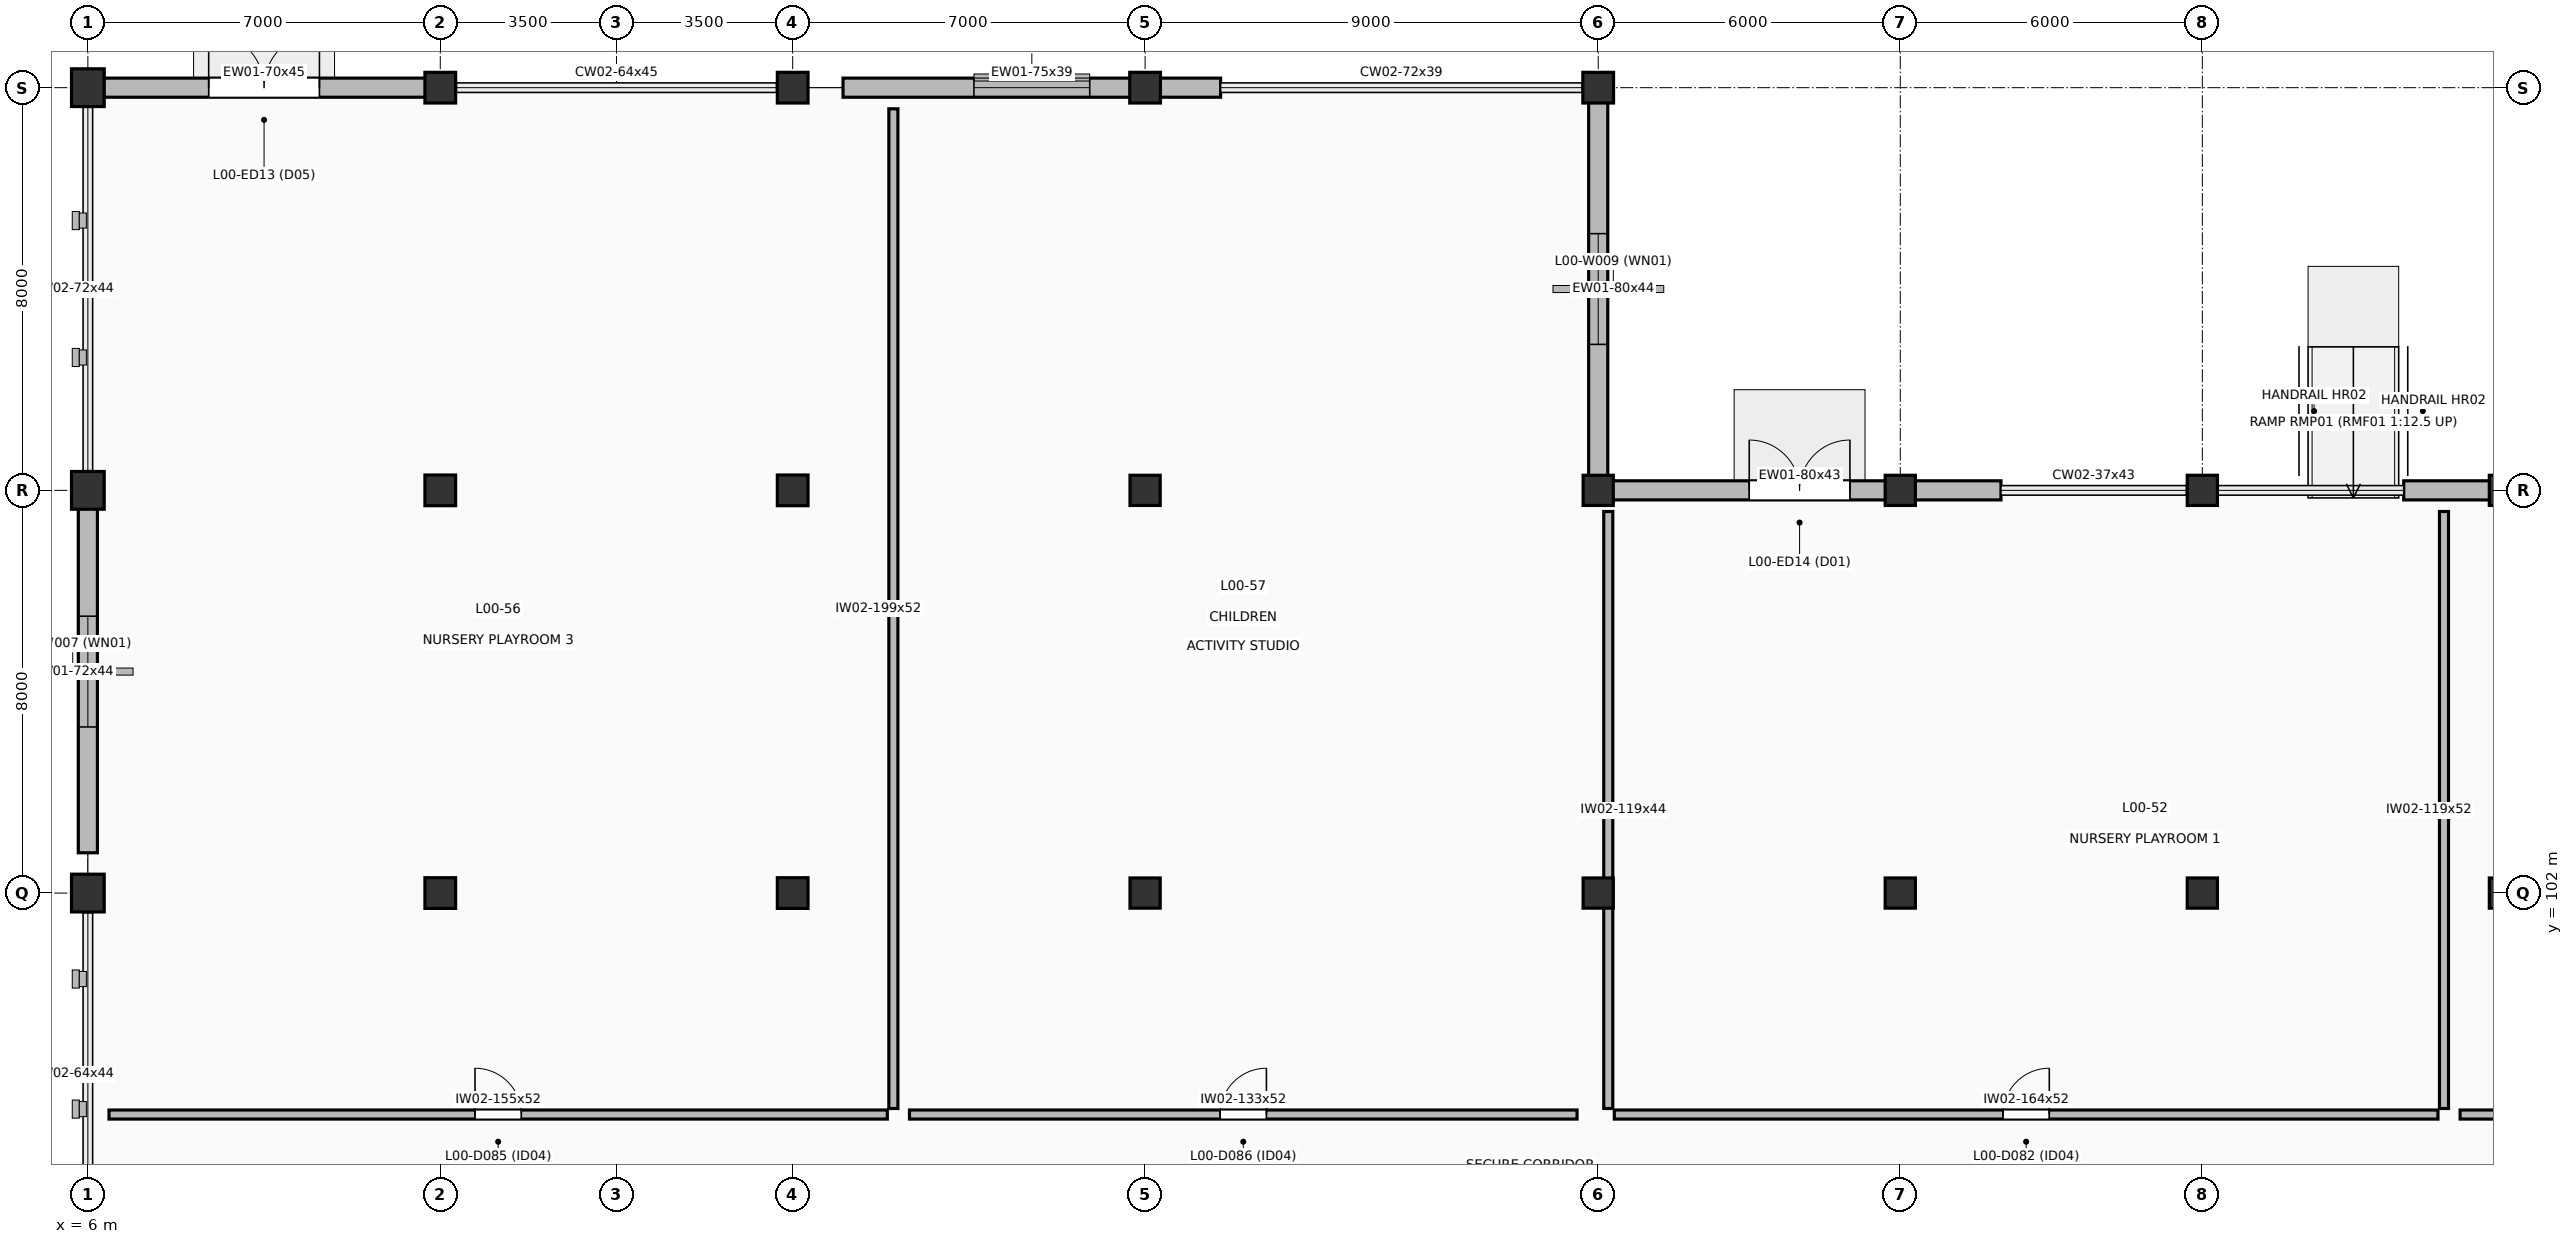
"""IFC4 building model, lengths in metres.
Left out: names, types, materials, properties, quantities, classifications, styles, units other than length and angle.
Written with IfcOpenShell. Run it as: python <this file> out.ifc"""

import sys

from ifc_helpers import new_model, si_unit, direction, frame, frame_2d, origin, origin_2d, place, context, subcontext, project, spatial, rectangle, extrude, element, fill, save


model = new_model("IFC4")
c1 = context("Model", 3, precision=1e-05, world=origin(), true_north=direction((0.0, 1.0)))
c2 = subcontext(c1, "Body", "Model", "MODEL_VIEW")
j1 = project(units=[si_unit("LENGTHUNIT", "METRE"), si_unit("PLANEANGLEUNIT", "RADIAN")], contexts=[c1])
p1 = place(None, origin())
s1 = spatial("IfcSite", under=j1, at=p1, CompositionType="ELEMENT")
p2 = place(p1, origin())
s2 = spatial("IfcBuilding", under=s1, at=p2, CompositionType="ELEMENT")
p3 = place(p2, origin())
s3 = spatial("IfcBuildingStorey", under=s2, at=p3, CompositionType="ELEMENT", Elevation=0.0)
for number, where, z_axis, x_axis in (
    (1, (6.0, 102.0, 0.0), (0.0, 0.0, 1.0), (1.0, 0.0, 0.0)),
    (2, (6.0, 110.0, 0.0), (0.0, 0.0, 1.0), (1.0, 0.0, 0.0)),
    (3, (6.0, 118.0, 0.0), (0.0, 0.0, 1.0), (1.0, 0.0, 0.0)),
):
    element("IfcColumn", number, at=place(p3, frame(where, z_axis=z_axis, x_axis=x_axis)), inside=s3, PredefinedType="PILASTER", context=c2, shape_type="SweptSolid", body=[
        extrude(rectangle(XDim=0.65, YDim=0.75, at=origin_2d()), origin(), (0.0, 0.0, 1.0), 5.4),
    ])
for number, where, z_axis, x_axis in (
    (4, (13.0, 102.0, 0.0), (0.0, 0.0, 1.0), (1.0, 0.0, 0.0)),
    (5, (13.0, 110.0, 0.0), (0.0, 0.0, 1.0), (1.0, 0.0, 0.0)),
    (6, (13.0, 118.0, 0.0), (0.0, 0.0, 1.0), (1.0, 0.0, 0.0)),
    (7, (20.0, 102.0, 0.0), (0.0, 0.0, 1.0), (1.0, 0.0, 0.0)),
    (8, (20.0, 110.0, 0.0), (0.0, 0.0, 1.0), (1.0, 0.0, 0.0)),
    (9, (20.0, 118.0, 0.0), (0.0, 0.0, 1.0), (1.0, 0.0, 0.0)),
):
    element("IfcColumn", number, at=place(p3, frame(where, z_axis=z_axis, x_axis=x_axis)), inside=s3, PredefinedType="COLUMN", context=c2, shape_type="SweptSolid", body=[
        extrude(rectangle(XDim=0.61, YDim=0.61, at=origin_2d()), origin(), (0.0, 0.0, 1.0), 5.4),
    ])
for number, where, z_axis, x_axis in (
    (10, (27.0, 102.0, 0.0), (0.0, 0.0, 1.0), (1.0, 0.0, 0.0)),
    (11, (27.0, 110.0, 0.0), (0.0, 0.0, 1.0), (1.0, 0.0, 0.0)),
):
    element("IfcColumn", number, at=place(p3, frame(where, z_axis=z_axis, x_axis=x_axis)), inside=s3, PredefinedType="COLUMN", context=c2, shape_type="SweptSolid", body=[
        extrude(rectangle(XDim=0.6, YDim=0.6, at=origin_2d()), origin(), (0.0, 0.0, 1.0), 5.4),
    ])
p4 = place(p3, frame((27.0, 118.0, 0.0), z_axis=(0.0, 0.0, 1.0), x_axis=(1.0, 0.0, 0.0)))
e12 = element("IfcColumn", 12, at=p4, inside=s3, PredefinedType="COLUMN", context=c2, shape_type="SweptSolid", body=[
    extrude(rectangle(XDim=0.61, YDim=0.61, at=origin_2d()), origin(), (0.0, 0.0, 1.0), 5.4),
])
for number, where, z_axis, x_axis in (
    (13, (36.0, 102.0, 0.0), (0.0, 0.0, 1.0), (1.0, 0.0, 0.0)),
    (14, (36.0, 110.0, 0.0), (0.0, 0.0, 1.0), (1.0, 0.0, 0.0)),
):
    element("IfcColumn", number, at=place(p3, frame(where, z_axis=z_axis, x_axis=x_axis)), inside=s3, PredefinedType="COLUMN", context=c2, shape_type="SweptSolid", body=[
        extrude(rectangle(XDim=0.6, YDim=0.6, at=origin_2d()), origin(), (0.0, 0.0, 1.0), 5.4),
    ])
p5 = place(p3, frame((36.0, 118.0, 0.0), z_axis=(0.0, 0.0, 1.0), x_axis=(1.0, 0.0, 0.0)))
e15 = element("IfcColumn", 15, at=p5, inside=s3, PredefinedType="COLUMN", context=c2, shape_type="SweptSolid", body=[
    extrude(rectangle(XDim=0.61, YDim=0.61, at=origin_2d()), origin(), (0.0, 0.0, 1.0), 5.4),
])
for number, where, z_axis, x_axis in (
    (16, (42.0, 102.0, 0.0), (0.0, 0.0, 1.0), (1.0, 0.0, 0.0)),
    (17, (42.0, 110.0, 0.0), (0.0, 0.0, 1.0), (1.0, 0.0, 0.0)),
    (18, (48.0, 102.0, 0.0), (0.0, 0.0, 1.0), (1.0, 0.0, 0.0)),
    (19, (48.0, 110.0, 0.0), (0.0, 0.0, 1.0), (1.0, 0.0, 0.0)),
    (20, (54.0, 102.0, 0.0), (0.0, 0.0, 1.0), (1.0, 0.0, 0.0)),
    (21, (54.0, 110.0, 0.0), (0.0, 0.0, 1.0), (1.0, 0.0, 0.0)),
):
    element("IfcColumn", number, at=place(p3, frame(where, z_axis=z_axis, x_axis=x_axis)), inside=s3, PredefinedType="COLUMN", context=c2, shape_type="SweptSolid", body=[
        extrude(rectangle(XDim=0.6, YDim=0.6, at=origin_2d()), origin(), (0.0, 0.0, 1.0), 5.4),
    ])
p6 = place(p3, frame((6.0, 102.8, 0.0), z_axis=(0.0, 0.0, 1.0), x_axis=(0.0, 1.0, 0.0)))
e22 = element("IfcWall", 22, at=p6, inside=s3, PredefinedType="SOLIDWALL", context=c2, shape_type="SweptSolid", body=[
    extrude(rectangle(XDim=7.2, YDim=0.38, at=frame_2d((3.6, 0.0))), origin(), (0.0, 0.0, 1.0), 4.445),
])
p7 = place(p6, frame((2.5, 0.0, 0.85)))
e23 = element("IfcOpeningElement", 23, at=p7, cuts=e22, PredefinedType="OPENING", context=c2, shape_type="SweptSolid", body=[
    extrude(rectangle(XDim=2.2, YDim=2.8, at=frame_2d((1.1, 1.4))), frame((0.0, 0.2, 0.0), z_axis=(0.0, -1.0, 0.0), x_axis=(1.0, 0.0, 0.0)), (0.0, 0.0, 1.0), 0.4),
])
p8 = place(p3, frame((6.0, 118.0, 0.0), z_axis=(0.0, 0.0, 1.0), x_axis=(1.0, 0.0, 0.0)))
e24 = element("IfcWall", 24, at=p8, inside=s3, PredefinedType="SOLIDWALL", context=c2, shape_type="SweptSolid", body=[
    extrude(rectangle(XDim=7.0, YDim=0.38, at=frame_2d((3.5, 0.0))), origin(), (0.0, 0.0, 1.0), 4.495),
])
p9 = place(p8, frame((2.4, 0.0, 0.0)))
e25 = element("IfcOpeningElement", 25, at=p9, cuts=e24, PredefinedType="OPENING", context=c2, shape_type="SweptSolid", body=[
    extrude(rectangle(XDim=2.2, YDim=2.45, at=frame_2d((1.1, 1.225))), frame((0.0, 0.2, 0.0), z_axis=(0.0, -1.0, 0.0), x_axis=(1.0, 0.0, 0.0)), (0.0, 0.0, 1.0), 0.4),
])
p10 = place(p3, frame((21.0, 118.0, 0.0), z_axis=(0.0, 0.0, 1.0), x_axis=(1.0, 0.0, 0.0)))
e26 = element("IfcWall", 26, at=p10, inside=s3, PredefinedType="SOLIDWALL", context=c2, shape_type="SweptSolid", body=[
    extrude(rectangle(XDim=7.5, YDim=0.38, at=frame_2d((3.75, 0.0))), origin(), (0.0, 0.0, 1.0), 3.945),
])
p11 = place(p10, frame((2.6, 0.0, 0.9)))
e27 = element("IfcOpeningElement", 27, at=p11, cuts=e26, PredefinedType="OPENING", context=c2, shape_type="SweptSolid", body=[
    extrude(rectangle(XDim=2.3, YDim=2.6, at=frame_2d((1.15, 1.3))), frame((0.0, 0.2, 0.0), z_axis=(0.0, -1.0, 0.0), x_axis=(1.0, 0.0, 0.0)), (0.0, 0.0, 1.0), 0.4),
])
p12 = place(p3, frame((36.0, 118.0, 0.0), z_axis=(0.0, 0.0, 1.0), x_axis=(0.0, -1.0, 0.0)))
e28 = element("IfcWall", 28, at=p12, inside=s3, PredefinedType="SOLIDWALL", context=c2, shape_type="SweptSolid", body=[
    extrude(rectangle(XDim=8.0, YDim=0.38, at=frame_2d((4.0, 0.0))), origin(), (0.0, 0.0, 1.0), 4.445),
])
p13 = place(p12, frame((2.9, 0.0, 0.85)))
e29 = element("IfcOpeningElement", 29, at=p13, cuts=e28, PredefinedType="OPENING", context=c2, shape_type="SweptSolid", body=[
    extrude(rectangle(XDim=2.2, YDim=2.8, at=frame_2d((1.1, 1.4))), frame((0.0, 0.2, 0.0), z_axis=(0.0, -1.0, 0.0), x_axis=(1.0, 0.0, 0.0)), (0.0, 0.0, 1.0), 0.4),
])
p14 = place(p3, frame((36.0, 110.0, 0.0), z_axis=(0.0, 0.0, 1.0), x_axis=(1.0, 0.0, 0.0)))
e30 = element("IfcWall", 30, at=p14, inside=s3, PredefinedType="SOLIDWALL", context=c2, shape_type="SweptSolid", body=[
    extrude(rectangle(XDim=8.0, YDim=0.38, at=frame_2d((4.0, 0.0))), origin(), (0.0, 0.0, 1.0), 4.315),
])
p15 = place(p14, frame((3.0, 0.0, 0.0)))
e31 = element("IfcOpeningElement", 31, at=p15, cuts=e30, PredefinedType="OPENING", context=c2, shape_type="SweptSolid", body=[
    extrude(rectangle(XDim=2.0, YDim=2.4, at=frame_2d((1.0, 1.2))), frame((0.0, 0.2, 0.0), z_axis=(0.0, -1.0, 0.0), x_axis=(1.0, 0.0, 0.0)), (0.0, 0.0, 1.0), 0.4),
])
p16 = place(p3, frame((52.0, 110.0, 0.0), z_axis=(0.0, 0.0, 1.0), x_axis=(1.0, 0.0, 0.0)))
e32 = element("IfcWall", 32, at=p16, inside=s3, PredefinedType="SOLIDWALL", context=c2, shape_type="SweptSolid", body=[
    extrude(rectangle(XDim=8.0, YDim=0.38, at=frame_2d((4.0, 0.0))), origin(), (0.0, 0.0, 1.0), 4.315),
])
p17 = place(p16, frame((3.15, 0.0, 1.8)))
e33 = element("IfcOpeningElement", 33, at=p17, cuts=e32, PredefinedType="OPENING", context=c2, shape_type="SweptSolid", body=[
    extrude(rectangle(XDim=1.7, YDim=1.1, at=frame_2d((0.85, 0.55))), frame((0.0, 0.2, 0.0), z_axis=(0.0, -1.0, 0.0), x_axis=(1.0, 0.0, 0.0)), (0.0, 0.0, 1.0), 0.4),
])
p18 = place(p3, frame((36.32, 97.6, 0.0), z_axis=(0.0, 0.0, 1.0), x_axis=(1.0, 0.0, 0.0)))
e34 = element("IfcWall", 34, at=p18, inside=s3, PredefinedType="PARTITIONING", context=c2, shape_type="SweptSolid", body=[
    extrude(rectangle(XDim=16.36, YDim=0.18, at=frame_2d((8.18, 0.0))), origin(), (0.0, 0.0, 1.0), 5.16),
])
p19 = place(p18, frame((7.72, 0.0, 0.0)))
e35 = element("IfcOpeningElement", 35, at=p19, cuts=e34, PredefinedType="OPENING", context=c2, shape_type="SweptSolid", body=[
    extrude(rectangle(XDim=0.92, YDim=2.1, at=frame_2d((0.46, 1.05))), frame((0.0, 0.1, 0.0), z_axis=(0.0, -1.0, 0.0), x_axis=(1.0, 0.0, 0.0)), (0.0, 0.0, 1.0), 0.2),
])
p20 = place(p3, frame((36.2, 109.58, 0.0), z_axis=(0.0, 0.0, 1.0), x_axis=(0.0, -1.0, 0.0)))
e36 = element("IfcWall", 36, at=p20, inside=s3, PredefinedType="PARTITIONING", context=c2, shape_type="SweptSolid", body=[
    extrude(rectangle(XDim=11.86, YDim=0.18, at=frame_2d((5.93, 0.0))), origin(), (0.0, 0.0, 1.0), 4.445),
])
p21 = place(p3, frame((52.8, 97.72, 0.0), z_axis=(0.0, 0.0, 1.0), x_axis=(0.0, 1.0, 0.0)))
e37 = element("IfcWall", 37, at=p21, inside=s3, PredefinedType="PARTITIONING", context=c2, shape_type="SweptSolid", body=[
    extrude(rectangle(XDim=11.86, YDim=0.18, at=frame_2d((5.93, 0.0))), origin(), (0.0, 0.0, 1.0), 5.16),
])
p22 = place(p3, frame((53.12, 97.6, 0.0), z_axis=(0.0, 0.0, 1.0), x_axis=(1.0, 0.0, 0.0)))
e38 = element("IfcWall", 38, at=p22, inside=s3, PredefinedType="PARTITIONING", context=c2, shape_type="SweptSolid", body=[
    extrude(rectangle(XDim=16.56, YDim=0.18, at=frame_2d((8.28, 0.0))), origin(), (0.0, 0.0, 1.0), 5.16),
])
p23 = place(p22, frame((7.82, 0.0, 0.0)))
e39 = element("IfcOpeningElement", 39, at=p23, cuts=e38, PredefinedType="OPENING", context=c2, shape_type="SweptSolid", body=[
    extrude(rectangle(XDim=0.92, YDim=2.1, at=frame_2d((0.46, 1.05))), frame((0.0, 0.1, 0.0), z_axis=(0.0, -1.0, 0.0), x_axis=(1.0, 0.0, 0.0)), (0.0, 0.0, 1.0), 0.2),
])
p24 = place(p3, frame((6.42, 97.6, 0.0), z_axis=(0.0, 0.0, 1.0), x_axis=(1.0, 0.0, 0.0)))
e40 = element("IfcWall", 40, at=p24, inside=s3, PredefinedType="PARTITIONING", context=c2, shape_type="SweptSolid", body=[
    extrude(rectangle(XDim=15.46, YDim=0.18, at=frame_2d((7.73, 0.0))), origin(), (0.0, 0.0, 1.0), 5.16),
])
p25 = place(p24, frame((7.27, 0.0, 0.0)))
e41 = element("IfcOpeningElement", 41, at=p25, cuts=e40, PredefinedType="OPENING", context=c2, shape_type="SweptSolid", body=[
    extrude(rectangle(XDim=0.92, YDim=2.1, at=frame_2d((0.46, 1.05))), frame((0.0, 0.1, 0.0), z_axis=(0.0, -1.0, 0.0), x_axis=(1.0, 0.0, 0.0)), (0.0, 0.0, 1.0), 0.2),
])
p26 = place(p3, frame((22.0, 97.72, 0.0), z_axis=(0.0, 0.0, 1.0), x_axis=(0.0, 1.0, 0.0)))
e42 = element("IfcWall", 42, at=p26, inside=s3, PredefinedType="PARTITIONING", context=c2, shape_type="SweptSolid", body=[
    extrude(rectangle(XDim=19.86, YDim=0.18, at=frame_2d((9.93, 0.0))), origin(), (0.0, 0.0, 1.0), 5.16),
])
p27 = place(p3, frame((22.32, 97.6, 0.0), z_axis=(0.0, 0.0, 1.0), x_axis=(1.0, 0.0, 0.0)))
e43 = element("IfcWall", 43, at=p27, inside=s3, PredefinedType="PARTITIONING", context=c2, shape_type="SweptSolid", body=[
    extrude(rectangle(XDim=13.26, YDim=0.18, at=frame_2d((6.63, 0.0))), origin(), (0.0, 0.0, 1.0), 5.16),
])
p28 = place(p27, frame((6.17, 0.0, 0.0)))
e44 = element("IfcOpeningElement", 44, at=p28, cuts=e43, PredefinedType="OPENING", context=c2, shape_type="SweptSolid", body=[
    extrude(rectangle(XDim=0.92, YDim=2.1, at=frame_2d((0.46, 1.05))), frame((0.0, 0.1, 0.0), z_axis=(0.0, -1.0, 0.0), x_axis=(1.0, 0.0, 0.0)), (0.0, 0.0, 1.0), 0.2),
])
p29 = place(p7, origin())
e45 = element("IfcWindow", 45, at=p29, inside=s3, PartitioningType="DOUBLE_PANEL_VERTICAL", PredefinedType="WINDOW", context=c2, shape_type="SweptSolid", body=[
    extrude(rectangle(XDim=2.2, YDim=2.8, at=frame_2d((1.1, 1.4))), frame((0.0, 0.03, 0.0), z_axis=(0.0, -1.0, 0.0), x_axis=(1.0, 0.0, 0.0)), (0.0, 0.0, 1.0), 0.06),
])
fill(e23, e45)
p30 = place(p9, origin())
e46 = element("IfcDoor", 46, at=p30, inside=s3, OperationType="DOUBLE_DOOR_SINGLE_SWING", PredefinedType="DOOR", context=c2, shape_type="SweptSolid", body=[
    extrude(rectangle(XDim=2.2, YDim=2.45, at=frame_2d((1.1, 1.225))), frame((0.0, 0.025, 0.0), z_axis=(0.0, -1.0, 0.0), x_axis=(1.0, 0.0, 0.0)), (0.0, 0.0, 1.0), 0.05),
])
fill(e25, e46)
p31 = place(p11, origin())
e47 = element("IfcWindow", 47, at=p31, inside=s3, PartitioningType="DOUBLE_PANEL_VERTICAL", PredefinedType="WINDOW", context=c2, shape_type="SweptSolid", body=[
    extrude(rectangle(XDim=2.3, YDim=2.6, at=frame_2d((1.15, 1.3))), frame((0.0, 0.03, 0.0), z_axis=(0.0, -1.0, 0.0), x_axis=(1.0, 0.0, 0.0)), (0.0, 0.0, 1.0), 0.06),
])
fill(e27, e47)
p32 = place(p13, origin())
e48 = element("IfcWindow", 48, at=p32, inside=s3, PartitioningType="DOUBLE_PANEL_VERTICAL", PredefinedType="WINDOW", context=c2, shape_type="SweptSolid", body=[
    extrude(rectangle(XDim=2.2, YDim=2.8, at=frame_2d((1.1, 1.4))), frame((0.0, 0.03, 0.0), z_axis=(0.0, -1.0, 0.0), x_axis=(1.0, 0.0, 0.0)), (0.0, 0.0, 1.0), 0.06),
])
fill(e29, e48)
p33 = place(p15, origin())
e49 = element("IfcDoor", 49, at=p33, inside=s3, OperationType="DOUBLE_DOOR_SINGLE_SWING", PredefinedType="DOOR", context=c2, shape_type="SweptSolid", body=[
    extrude(rectangle(XDim=2.0, YDim=2.4, at=frame_2d((1.0, 1.2))), frame((0.0, 0.025, 0.0), z_axis=(0.0, -1.0, 0.0), x_axis=(1.0, 0.0, 0.0)), (0.0, 0.0, 1.0), 0.05),
])
fill(e31, e49)
p34 = place(p19, origin())
e50 = element("IfcDoor", 50, at=p34, inside=s3, OperationType="SINGLE_SWING_RIGHT", PredefinedType="DOOR", context=c2, shape_type="SweptSolid", body=[
    extrude(rectangle(XDim=0.92, YDim=2.1, at=frame_2d((0.46, 1.05))), frame((0.0, 0.025, 0.0), z_axis=(0.0, -1.0, 0.0), x_axis=(1.0, 0.0, 0.0)), (0.0, 0.0, 1.0), 0.05),
])
fill(e35, e50)
p35 = place(p25, origin())
e51 = element("IfcDoor", 51, at=p35, inside=s3, OperationType="SINGLE_SWING_LEFT", PredefinedType="DOOR", context=c2, shape_type="SweptSolid", body=[
    extrude(rectangle(XDim=0.92, YDim=2.1, at=frame_2d((0.46, 1.05))), frame((0.0, 0.025, 0.0), z_axis=(0.0, -1.0, 0.0), x_axis=(1.0, 0.0, 0.0)), (0.0, 0.0, 1.0), 0.05),
])
fill(e41, e51)
p36 = place(p28, origin())
e52 = element("IfcDoor", 52, at=p36, inside=s3, OperationType="SINGLE_SWING_RIGHT", PredefinedType="DOOR", context=c2, shape_type="SweptSolid", body=[
    extrude(rectangle(XDim=0.92, YDim=2.1, at=frame_2d((0.46, 1.05))), frame((0.0, 0.025, 0.0), z_axis=(0.0, -1.0, 0.0), x_axis=(1.0, 0.0, 0.0)), (0.0, 0.0, 1.0), 0.05),
])
fill(e44, e52)
save(model, sys.argv[1])
